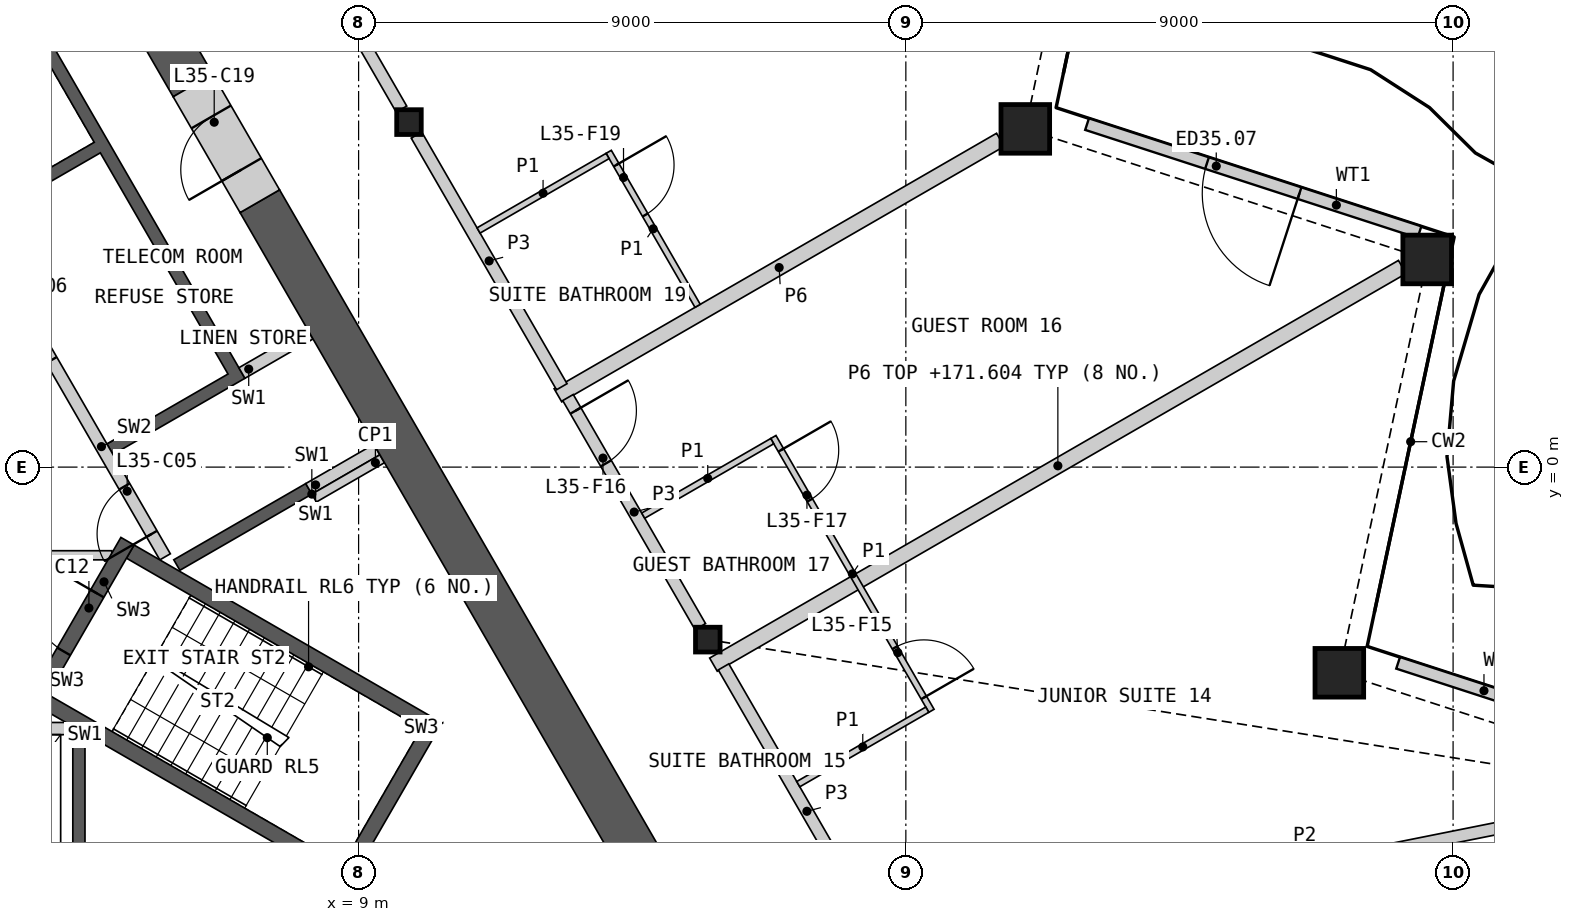
"""IFC4 building model, lengths in metres.
Left out: names, types, materials, properties, quantities, classifications, styles, units other than length and angle.
Written with IfcOpenShell. Run it as: python <this file> out.ifc"""

import sys

from ifc_helpers import new_model, si_unit, direction, frame, frame_2d, origin, origin_2d, place, context, subcontext, project, spatial, polyline, rectangle, hollow_rectangle, i_section, outline, extrude, element, fill, save


model = new_model("IFC4")
c1 = context("Model", 3, precision=1e-05, world=origin(), true_north=direction((0.0, 1.0)))
c2 = subcontext(c1, "Body", "Model", "MODEL_VIEW")
j1 = project(units=[si_unit("LENGTHUNIT", "METRE"), si_unit("PLANEANGLEUNIT", "RADIAN")], contexts=[c1])
p1 = place(None, origin())
s1 = spatial("IfcSite", under=j1, at=p1, CompositionType="ELEMENT")
p2 = place(p1, origin())
s2 = spatial("IfcBuilding", under=s1, at=p2, CompositionType="ELEMENT")
p3 = place(p2, frame((0.0, 0.0, 169.2)))
s3 = spatial("IfcBuildingStorey", under=s2, at=p3, CompositionType="ELEMENT", Elevation=169.2)
for number, where, z_axis, x_axis in (
    (1, (25.129, -3.383, 0.0), (0.0, 0.0, 1.0), (1.0, 0.0, 0.0)),
    (2, (26.574, 3.415, 0.0), (0.0, 0.0, 1.0), (1.0, 0.0, 0.0)),
    (3, (19.965, 5.563, 0.0), (0.0, 0.0, 1.0), (1.0, 0.0, 0.0)),
):
    element("IfcColumn", number, at=place(p3, frame(where, z_axis=z_axis, x_axis=x_axis)), inside=s3, PredefinedType="COLUMN", context=c2, shape_type="SweptSolid", body=[
        extrude(hollow_rectangle(XDim=0.8, YDim=0.8, WallThickness=0.05, at=origin_2d()), origin(), (0.0, 0.0, 1.0), 3.6),
    ])
for number, where, z_axis, x_axis in (
    (4, (14.743, -2.837, 0.0), (0.0, 0.0, 1.0), (1.0, 0.0, 0.0)),
    (5, (9.828, 5.675, 0.0), (0.0, 0.0, 1.0), (1.0, 0.0, 0.0)),
):
    element("IfcColumn", number, at=place(p3, frame(where, z_axis=z_axis, x_axis=x_axis)), inside=s3, PredefinedType="COLUMN", context=c2, shape_type="SweptSolid", body=[
        extrude(i_section(OverallWidth=0.404, OverallDepth=0.407, WebThickness=0.027, FlangeThickness=0.044, at=origin_2d()), origin(), (0.0, 0.0, 1.0), 3.6),
    ])
p4 = place(p3, frame((31.743, -5.054, 0.0), z_axis=(0.0, 0.0, 1.0), x_axis=(-0.951061260164, 0.309002393867, 0.0)))
e6 = element("IfcWall", 6, at=p4, inside=s3, PredefinedType="SOLIDWALL", context=c2, shape_type="SweptSolid", body=[
    extrude(rectangle(XDim=5.938, YDim=0.2, at=frame_2d((2.969, 0.0))), origin(), (0.0, 0.0, 1.0), 2.701),
])
p5 = place(p4, frame((2.264, 0.0, 0.0)))
e7 = element("IfcOpeningElement", 7, at=p5, cuts=e6, PredefinedType="OPENING", context=c2, shape_type="SweptSolid", body=[
    extrude(rectangle(XDim=1.6, YDim=2.4, at=frame_2d((0.8, 1.2))), frame((0.0, 0.11, 0.0), z_axis=(0.0, -1.0, 0.0), x_axis=(1.0, 0.0, 0.0)), (0.0, 0.0, 1.0), 0.22),
])
p6 = place(p3, frame((26.447, 3.865, 0.0), z_axis=(0.0, 0.0, 1.0), x_axis=(-0.951043432761, 0.309057258453, 0.0)))
e8 = element("IfcWall", 8, at=p6, inside=s3, PredefinedType="SOLIDWALL", context=c2, shape_type="SweptSolid", body=[
    extrude(rectangle(XDim=5.748, YDim=0.2, at=frame_2d((2.874, 0.0))), origin(), (0.0, 0.0, 1.0), 2.701),
])
p7 = place(p6, frame((2.074, 0.0, 0.0)))
e9 = element("IfcOpeningElement", 9, at=p7, cuts=e8, PredefinedType="OPENING", context=c2, shape_type="SweptSolid", body=[
    extrude(rectangle(XDim=1.6, YDim=2.4, at=frame_2d((0.8, 1.2))), frame((0.0, 0.11, 0.0), z_axis=(0.0, -1.0, 0.0), x_axis=(1.0, 0.0, 0.0)), (0.0, 0.0, 1.0), 0.22),
])
p8 = place(p3, origin())
e10 = element("IfcWall", 10, at=p8, inside=s3, PredefinedType="SHEAR", context=c2, shape_type="SweptSolid", body=[
    extrude(outline(polyline([(4.5, -4.4), (4.5, -6.906), (2.1, -6.906), (2.1, -4.4), (2.3, -4.4), (2.3, -6.7), (4.3, -6.7), (4.3, -4.4), (4.5, -4.4)])), origin(), (0.0, 0.0, 1.0), 3.25),
])
p9 = place(p3, frame((-4.187, -4.3, 0.0), z_axis=(0.0, 0.0, 1.0), x_axis=(1.0, 0.0, 0.0)))
e11 = element("IfcWall", 11, at=p9, inside=s3, PredefinedType="SOLIDWALL", context=c2, shape_type="SweptSolid", body=[
    extrude(rectangle(XDim=8.373, YDim=0.2, at=frame_2d((4.187, 0.0))), origin(), (0.0, 0.0, 1.0), 3.25),
])
p10 = place(p9, frame((0.287, 0.0, 0.0)))
e12 = element("IfcOpeningElement", 12, at=p10, cuts=e11, PredefinedType="OPENING", context=c2, shape_type="SweptSolid", body=[
    extrude(rectangle(XDim=1.2, YDim=2.1, at=frame_2d((0.6, 1.05))), frame((0.0, 0.11, 0.0), z_axis=(0.0, -1.0, 0.0), x_axis=(1.0, 0.0, 0.0)), (0.0, 0.0, 1.0), 0.22),
])
p11 = place(p9, frame((2.387, 0.0, 0.0)))
e13 = element("IfcOpeningElement", 13, at=p11, cuts=e11, PredefinedType="OPENING", context=c2, shape_type="SweptSolid", body=[
    extrude(rectangle(XDim=1.4, YDim=2.1, at=frame_2d((0.7, 1.05))), frame((0.0, 0.11, 0.0), z_axis=(0.0, -1.0, 0.0), x_axis=(1.0, 0.0, 0.0)), (0.0, 0.0, 1.0), 0.22),
])
p12 = place(p9, frame((4.837, 0.0, 0.0)))
e14 = element("IfcOpeningElement", 14, at=p12, cuts=e11, PredefinedType="OPENING", context=c2, shape_type="SweptSolid", body=[
    extrude(rectangle(XDim=0.9, YDim=2.1, at=frame_2d((0.45, 1.05))), frame((0.0, 0.11, 0.0), z_axis=(0.0, -1.0, 0.0), x_axis=(1.0, 0.0, 0.0)), (0.0, 0.0, 1.0), 0.22),
])
p13 = place(p9, frame((6.887, 0.0, 0.0)))
e15 = element("IfcOpeningElement", 15, at=p13, cuts=e11, PredefinedType="OPENING", context=c2, shape_type="SweptSolid", body=[
    extrude(rectangle(XDim=1.2, YDim=2.1, at=frame_2d((0.6, 1.05))), frame((0.0, 0.11, 0.0), z_axis=(0.0, -1.0, 0.0), x_axis=(1.0, 0.0, 0.0)), (0.0, 0.0, 1.0), 0.22),
])
p14 = place(p3, origin())
e16 = element("IfcWall", 16, at=p14, inside=s3, PredefinedType="SHEAR", context=c2, shape_type="SweptSolid", body=[
    extrude(outline(polyline([(1.561, 6.097), (3.731, 7.35), (7.131, 1.461), (4.96, 0.208), (4.861, 0.381), (6.852, 1.531), (4.752, 5.169), (2.76, 4.019), (2.66, 4.192), (4.652, 5.342), (3.652, 7.074), (1.66, 5.924), (1.561, 6.097)])), origin(), (0.0, 0.0, 1.0), 3.25),
])
p15 = place(p3, origin())
e17 = element("IfcWall", 17, at=p15, inside=s3, PredefinedType="SHEAR", context=c2, shape_type="SweptSolid", body=[
    extrude(outline(polyline([(8.231, -0.444), (6.061, -1.697), (5.96, -1.524), (8.131, -0.271), (8.231, -0.444)])), origin(), (0.0, 0.0, 1.0), 3.25),
])
p16 = place(p3, frame((5.817, -1.476, 0.0), z_axis=(0.0, 0.0, 1.0), x_axis=(-0.500002616675, 0.866023893041, 0.0)))
e18 = element("IfcWall", 18, at=p16, inside=s3, PredefinedType="SOLIDWALL", context=c2, shape_type="SweptSolid", body=[
    extrude(rectangle(XDim=8.373, YDim=0.2, at=frame_2d((4.187, 0.0))), origin(), (0.0, 0.0, 1.0), 3.25),
])
p17 = place(p16, frame((0.437, 0.0, 0.0)))
e19 = element("IfcOpeningElement", 19, at=p17, cuts=e18, PredefinedType="OPENING", context=c2, shape_type="SweptSolid", body=[
    extrude(rectangle(XDim=0.9, YDim=2.1, at=frame_2d((0.45, 1.05))), frame((0.0, 0.11, 0.0), z_axis=(0.0, -1.0, 0.0), x_axis=(1.0, 0.0, 0.0)), (0.0, 0.0, 1.0), 0.22),
])
p18 = place(p16, frame((3.737, 0.0, 0.0)))
e20 = element("IfcOpeningElement", 20, at=p18, cuts=e18, PredefinedType="OPENING", context=c2, shape_type="SweptSolid", body=[
    extrude(rectangle(XDim=0.9, YDim=2.1, at=frame_2d((0.45, 1.05))), frame((0.0, 0.11, 0.0), z_axis=(0.0, -1.0, 0.0), x_axis=(1.0, 0.0, 0.0)), (0.0, 0.0, 1.0), 0.22),
])
p19 = place(p16, frame((6.937, 0.0, 0.0)))
e21 = element("IfcOpeningElement", 21, at=p19, cuts=e18, PredefinedType="OPENING", context=c2, shape_type="SweptSolid", body=[
    extrude(rectangle(XDim=1.1, YDim=2.1, at=frame_2d((0.55, 1.05))), frame((0.0, 0.11, 0.0), z_axis=(0.0, -1.0, 0.0), x_axis=(1.0, 0.0, 0.0)), (0.0, 0.0, 1.0), 0.22),
])
for number, where, z_axis, x_axis in (
    (22, (8.181, -0.357, 0.0), (0.0, 0.0, 1.0), (0.866, 0.5, 0.0)),
    (23, (7.081, 1.548, 0.0), (0.0, 0.0, 1.0), (0.866, 0.5, 0.0)),
):
    element("IfcWall", number, at=place(p3, frame(where, z_axis=z_axis, x_axis=x_axis)), inside=s3, PredefinedType="SHEAR", context=c2, shape_type="SweptSolid", body=[
        extrude(rectangle(XDim=1.293, YDim=0.2, at=frame_2d((0.646, 0.0))), origin(), (0.0, 0.0, 1.0), 3.25),
    ])
p20 = place(p3, frame((-4.941, -1.45, 0.0), z_axis=(0.0, 0.0, 1.0), x_axis=(1.0, 0.0, 0.0)))
e24 = element("IfcWall", 24, at=p20, inside=s3, PredefinedType="PARTITIONING", context=c2, shape_type="SweptSolid", body=[
    extrude(rectangle(XDim=9.882, YDim=0.15, at=frame_2d((4.941, 0.0))), origin(), (0.0, 0.0, 1.0), 3.25),
])
p21 = place(p20, frame((4.391, 0.0, 0.0)))
e25 = element("IfcOpeningElement", 25, at=p21, cuts=e24, PredefinedType="OPENING", context=c2, shape_type="SweptSolid", body=[
    extrude(rectangle(XDim=1.1, YDim=2.1, at=frame_2d((0.55, 1.05))), frame((0.0, 0.085, 0.0), z_axis=(0.0, -1.0, 0.0), x_axis=(1.0, 0.0, 0.0)), (0.0, 0.0, 1.0), 0.17),
])
p22 = place(p3, origin())
e26 = element("IfcWall", 26, at=p22, inside=s3, PredefinedType="SHEAR", context=c2, shape_type="SweptSolid", body=[
    extrude(outline(polyline([(3.763, -3.956), (8.83, -6.881), (8.738, -6.539), (3.888, -3.739), (3.763, -3.956)])), origin(), (0.0, 0.0, 1.0), 3.25),
])
p23 = place(p3, origin())
e27 = element("IfcWall", 27, at=p23, inside=s3, PredefinedType="SHEAR", context=c2, shape_type="SweptSolid", body=[
    extrude(outline(polyline([(8.83, -6.881), (10.374, -4.206), (10.032, -4.298), (8.738, -6.539), (8.83, -6.881)])), origin(), (0.0, 0.0, 1.0), 3.25),
])
p24 = place(p3, origin())
e28 = element("IfcWall", 28, at=p24, inside=s3, PredefinedType="SHEAR", context=c2, shape_type="SweptSolid", body=[
    extrude(outline(polyline([(10.032, -4.298), (10.374, -4.206), (5.307, -1.281), (5.182, -1.498), (10.032, -4.298)])), origin(), (0.0, 0.0, 1.0), 3.25),
])
p25 = place(p3, frame((3.655, -3.893, 0.0), z_axis=(0.0, 0.0, 1.0), x_axis=(0.499982516597, 0.866035497597, 0.0)))
e29 = element("IfcWall", 29, at=p25, inside=s3, PredefinedType="SHEAR", context=c2, shape_type="SweptSolid", body=[
    extrude(rectangle(XDim=3.088, YDim=0.25, at=frame_2d((1.544, 0.0))), origin(), (0.0, 0.0, 1.0), 3.25),
])
p26 = place(p25, frame((0.994, 0.0, 0.0)))
e30 = element("IfcOpeningElement", 30, at=p26, cuts=e29, PredefinedType="OPENING", context=c2, shape_type="SweptSolid", body=[
    extrude(rectangle(XDim=1.1, YDim=2.1, at=frame_2d((0.55, 1.05))), frame((0.0, 0.135, 0.0), z_axis=(0.0, -1.0, 0.0), x_axis=(1.0, 0.0, 0.0)), (0.0, 0.0, 1.0), 0.27),
])
p27 = place(p3, frame((8.268, -0.509, 0.0), z_axis=(0.0, 0.0, 1.0), x_axis=(0.866003189247, 0.500038474733, 0.0)))
e31 = element("IfcWall", 31, at=p27, inside=s3, PredefinedType="PARTITIONING", context=c2, shape_type="SweptSolid", body=[
    extrude(rectangle(XDim=1.293, YDim=0.15, at=frame_2d((0.646, 0.0))), origin(), (0.0, 0.0, 1.0), 3.25),
])
p28 = place(p3, frame((14.526, -8.011, 0.0), z_axis=(0.0, 0.0, 1.0), x_axis=(-0.499994855372, 0.866028374016, 0.0)))
e32 = element("IfcWall", 32, at=p28, inside=s3, PredefinedType="SHEAR", context=c2, shape_type="SweptSolid", body=[
    extrude(rectangle(XDim=14.301, YDim=0.75, at=frame_2d((7.15, 0.0))), origin(), (0.0, 0.0, 1.0), 3.25),
])
p29 = place(p3, frame((6.275, 6.279, 0.0), z_axis=(0.0, 0.0, 1.0), x_axis=(-0.500029273391, 0.866008502124, 0.0)))
e33 = element("IfcWall", 33, at=p29, inside=s3, PredefinedType="SHEAR", context=c2, shape_type="SweptSolid", body=[
    extrude(rectangle(XDim=2.916, YDim=0.75, at=frame_2d((1.458, 0.0))), origin(), (0.0, 0.0, 1.0), 3.25),
])
p30 = place(p3, frame((7.375, 4.374, 0.0), z_axis=(0.0, 0.0, 1.0), x_axis=(-0.499946605688, 0.86605622881, 0.0)))
e34 = element("IfcWall", 34, at=p30, inside=s3, PredefinedType="SHEAR", context=c2, shape_type="SweptSolid", body=[
    extrude(rectangle(XDim=2.2, YDim=0.75, at=frame_2d((1.1, 0.0))), origin(), (0.0, 0.0, 1.0), 3.25),
])
p31 = place(p30, frame((0.6, 0.0, 0.0)))
e35 = element("IfcOpeningElement", 35, at=p31, cuts=e34, PredefinedType="OPENING", context=c2, shape_type="SweptSolid", body=[
    extrude(rectangle(XDim=1.0, YDim=2.1, at=frame_2d((0.5, 1.05))), frame((0.0, 0.385, 0.0), z_axis=(0.0, -1.0, 0.0), x_axis=(1.0, 0.0, 0.0)), (0.0, 0.0, 1.0), 0.77),
])
p32 = place(p3, frame((14.836, -3.249, 0.0), z_axis=(0.0, 0.0, 1.0), x_axis=(0.866022412254, 0.500005181446, 0.0)))
e36 = element("IfcWall", 36, at=p32, inside=s3, PredefinedType="PARTITIONING", context=c2, shape_type="SweptSolid", body=[
    extrude(rectangle(XDim=13.081, YDim=0.25, at=frame_2d((6.541, 0.0))), origin(), (0.0, 0.0, 1.0), 2.404),
])
p33 = place(p3, frame((5.038, 13.972, 0.0), z_axis=(0.0, 0.0, 1.0), x_axis=(0.50000393355, -0.866023132736, 0.0)))
e37 = element("IfcWall", 37, at=p33, inside=s3, PredefinedType="PARTITIONING", context=c2, shape_type="SweptSolid", body=[
    extrude(rectangle(XDim=9.335, YDim=0.2, at=frame_2d((4.667, 0.0))), origin(), (0.0, 0.0, 1.0), 3.25),
])
p34 = place(p33, frame((1.154, 0.0, 0.0)))
e38 = element("IfcOpeningElement", 38, at=p34, cuts=e37, PredefinedType="OPENING", context=c2, shape_type="SweptSolid", body=[
    extrude(rectangle(XDim=1.1, YDim=2.1, at=frame_2d((0.55, 1.05))), frame((0.0, 0.11, 0.0), z_axis=(0.0, -1.0, 0.0), x_axis=(1.0, 0.0, 0.0)), (0.0, 0.0, 1.0), 0.22),
])
p35 = place(p3, frame((12.278, 1.182, 0.0), z_axis=(0.0, 0.0, 1.0), x_axis=(0.866024457297, 0.500001639361, 0.0)))
e39 = element("IfcWall", 39, at=p35, inside=s3, PredefinedType="PARTITIONING", context=c2, shape_type="SweptSolid", body=[
    extrude(rectangle(XDim=8.402, YDim=0.25, at=frame_2d((4.201, 0.0))), origin(), (0.0, 0.0, 1.0), 2.404),
])
p36 = place(p3, frame((15.002, -3.286, 0.0), z_axis=(0.0, 0.0, 1.0), x_axis=(0.500007607708, -0.866021011428, 0.0)))
e40 = element("IfcWall", 40, at=p36, inside=s3, PredefinedType="PARTITIONING", context=c2, shape_type="SweptSolid", body=[
    extrude(rectangle(XDim=5.484, YDim=0.2, at=frame_2d((2.742, 0.0))), origin(), (0.0, 0.0, 1.0), 3.25),
])
p37 = place(p36, frame((4.032, 0.0, 0.0)))
e41 = element("IfcOpeningElement", 41, at=p37, cuts=e40, PredefinedType="OPENING", context=c2, shape_type="SweptSolid", body=[
    extrude(rectangle(XDim=1.1, YDim=2.1, at=frame_2d((0.55, 1.05))), frame((0.0, 0.11, 0.0), z_axis=(0.0, -1.0, 0.0), x_axis=(1.0, 0.0, 0.0)), (0.0, 0.0, 1.0), 0.22),
])
p38 = place(p3, frame((9.952, 5.461, 0.0), z_axis=(0.0, 0.0, 1.0), x_axis=(0.499990736708, -0.866030751883, 0.0)))
e42 = element("IfcWall", 42, at=p38, inside=s3, PredefinedType="PARTITIONING", context=c2, shape_type="SweptSolid", body=[
    extrude(rectangle(XDim=4.779, YDim=0.2, at=frame_2d((2.389, 0.0))), origin(), (0.0, 0.0, 1.0), 3.25),
])
p39 = place(p3, frame((12.444, 1.145, 0.0), z_axis=(0.0, 0.0, 1.0), x_axis=(0.500007404367, -0.866021128829, 0.0)))
e43 = element("IfcWall", 43, at=p39, inside=s3, PredefinedType="PARTITIONING", context=c2, shape_type="SweptSolid", body=[
    extrude(rectangle(XDim=4.351, YDim=0.2, at=frame_2d((2.176, 0.0))), origin(), (0.0, 0.0, 1.0), 3.25),
])
p40 = place(p39, frame((0.25, 0.0, 0.0)))
e44 = element("IfcOpeningElement", 44, at=p40, cuts=e43, PredefinedType="OPENING", context=c2, shape_type="SweptSolid", body=[
    extrude(rectangle(XDim=1.0, YDim=2.1, at=frame_2d((0.5, 1.05))), frame((0.0, 0.11, 0.0), z_axis=(0.0, -1.0, 0.0), x_axis=(1.0, 0.0, 0.0)), (0.0, 0.0, 1.0), 0.22),
])
p41 = place(p3, frame((17.792, -7.929, 0.0), z_axis=(0.0, 0.0, 1.0), x_axis=(0.980565709097, 0.196190953266, 0.0)))
e45 = element("IfcWall", 45, at=p41, inside=s3, PredefinedType="PARTITIONING", context=c2, shape_type="SweptSolid", body=[
    extrude(rectangle(XDim=13.805, YDim=0.2, at=frame_2d((6.903, 0.0))), origin(), (0.0, 0.0, 1.0), 2.404),
])
p42 = place(p3, frame((15.821, 0.495, 0.0), z_axis=(0.0, 0.0, 1.0), x_axis=(0.500006934395, -0.866021400173, 0.0)))
e46 = element("IfcWall", 46, at=p42, inside=s3, PredefinedType="PARTITIONING", context=c2, shape_type="SweptSolid", body=[
    extrude(rectangle(XDim=5.2, YDim=0.1, at=frame_2d((2.6, 0.0))), origin(), (0.0, 0.0, 1.0), 2.404),
])
p43 = place(p42, frame((4.0, 0.0, 0.0)))
e47 = element("IfcOpeningElement", 47, at=p43, cuts=e46, PredefinedType="OPENING", context=c2, shape_type="SweptSolid", body=[
    extrude(rectangle(XDim=0.95, YDim=2.1, at=frame_2d((0.475, 1.05))), frame((0.0, 0.06, 0.0), z_axis=(0.0, -1.0, 0.0), x_axis=(1.0, 0.0, 0.0)), (0.0, 0.0, 1.0), 0.12),
])
p44 = place(p42, frame((0.25, 0.0, 0.0)))
e48 = element("IfcOpeningElement", 48, at=p44, cuts=e46, PredefinedType="OPENING", context=c2, shape_type="SweptSolid", body=[
    extrude(rectangle(XDim=0.95, YDim=2.1, at=frame_2d((0.475, 1.05))), frame((0.0, 0.06, 0.0), z_axis=(0.0, -1.0, 0.0), x_axis=(1.0, 0.0, 0.0)), (0.0, 0.0, 1.0), 0.12),
])
p45 = place(p3, frame((13.113, 5.186, 0.0), z_axis=(0.0, 0.0, 1.0), x_axis=(0.499963291492, -0.866046596414, 0.0)))
e49 = element("IfcWall", 49, at=p45, inside=s3, PredefinedType="PARTITIONING", context=c2, shape_type="SweptSolid", body=[
    extrude(rectangle(XDim=2.925, YDim=0.1, at=frame_2d((1.462, 0.0))), origin(), (0.0, 0.0, 1.0), 2.404),
])
p46 = place(p45, frame((0.25, 0.0, 0.0)))
e50 = element("IfcOpeningElement", 50, at=p46, cuts=e49, PredefinedType="OPENING", context=c2, shape_type="SweptSolid", body=[
    extrude(rectangle(XDim=0.95, YDim=2.1, at=frame_2d((0.475, 1.05))), frame((0.0, 0.06, 0.0), z_axis=(0.0, -1.0, 0.0), x_axis=(1.0, 0.0, 0.0)), (0.0, 0.0, 1.0), 0.12),
])
p47 = place(p3, frame((16.231, -5.215, 0.0), z_axis=(0.0, 0.0, 1.0), x_axis=(0.866057815567, 0.499943856944, 0.0)))
e51 = element("IfcWall", 51, at=p47, inside=s3, PredefinedType="PARTITIONING", context=c2, shape_type="SweptSolid", body=[
    extrude(rectangle(XDim=2.45, YDim=0.1, at=frame_2d((1.225, 0.0))), origin(), (0.0, 0.0, 1.0), 2.404),
])
p48 = place(p3, frame((13.681, -0.798, 0.0), z_axis=(0.0, 0.0, 1.0), x_axis=(0.866032905446, 0.499987006516, 0.0)))
e52 = element("IfcWall", 52, at=p48, inside=s3, PredefinedType="PARTITIONING", context=c2, shape_type="SweptSolid", body=[
    extrude(rectangle(XDim=2.45, YDim=0.1, at=frame_2d((1.225, 0.0))), origin(), (0.0, 0.0, 1.0), 2.404),
])
p49 = place(p3, frame((10.973, 3.892, 0.0), z_axis=(0.0, 0.0, 1.0), x_axis=(0.866014668023, 0.500018594424, 0.0)))
e53 = element("IfcWall", 53, at=p49, inside=s3, PredefinedType="PARTITIONING", context=c2, shape_type="SweptSolid", body=[
    extrude(rectangle(XDim=2.45, YDim=0.1, at=frame_2d((1.225, 0.0))), origin(), (0.0, 0.0, 1.0), 2.404),
])
p50 = place(p7, origin())
e54 = element("IfcDoor", 54, at=p50, inside=s3, OperationType="DOUBLE_DOOR_SINGLE_SWING", PredefinedType="DOOR", context=c2, shape_type="SweptSolid", body=[
    extrude(rectangle(XDim=1.6, YDim=2.4, at=frame_2d((0.8, 1.2))), frame((0.0, 0.025, 0.0), z_axis=(0.0, -1.0, 0.0), x_axis=(1.0, 0.0, 0.0)), (0.0, 0.0, 1.0), 0.05),
])
fill(e9, e54)
p51 = place(p17, origin())
e55 = element("IfcDoor", 55, at=p51, inside=s3, OperationType="SINGLE_SWING_LEFT", PredefinedType="DOOR", context=c2, shape_type="SweptSolid", body=[
    extrude(rectangle(XDim=0.9, YDim=2.1, at=frame_2d((0.45, 1.05))), frame((0.0, 0.025, 0.0), z_axis=(0.0, -1.0, 0.0), x_axis=(1.0, 0.0, 0.0)), (0.0, 0.0, 1.0), 0.05),
])
fill(e19, e55)
p52 = place(p18, origin())
e56 = element("IfcDoor", 56, at=p52, inside=s3, OperationType="SINGLE_SWING_RIGHT", PredefinedType="DOOR", context=c2, shape_type="SweptSolid", body=[
    extrude(rectangle(XDim=0.9, YDim=2.1, at=frame_2d((0.45, 1.05))), frame((0.0, 0.025, 0.0), z_axis=(0.0, -1.0, 0.0), x_axis=(1.0, 0.0, 0.0)), (0.0, 0.0, 1.0), 0.05),
])
fill(e20, e56)
p53 = place(p26, origin())
e57 = element("IfcDoor", 57, at=p53, inside=s3, OperationType="SINGLE_SWING_RIGHT", PredefinedType="DOOR", context=c2, shape_type="SweptSolid", body=[
    extrude(rectangle(XDim=1.1, YDim=2.1, at=frame_2d((0.55, 1.05))), frame((0.0, 0.025, 0.0), z_axis=(0.0, -1.0, 0.0), x_axis=(1.0, 0.0, 0.0)), (0.0, 0.0, 1.0), 0.05),
])
fill(e30, e57)
p54 = place(p31, origin())
e58 = element("IfcDoor", 58, at=p54, inside=s3, OperationType="SINGLE_SWING_LEFT", PredefinedType="DOOR", context=c2, shape_type="SweptSolid", body=[
    extrude(rectangle(XDim=1.0, YDim=2.1, at=frame_2d((0.5, 1.05))), frame((0.0, 0.13, 0.0), z_axis=(0.0, -1.0, 0.0), x_axis=(1.0, 0.0, 0.0)), (0.0, 0.0, 1.0), 0.05),
])
fill(e35, e58)
p55 = place(p43, origin())
e59 = element("IfcDoor", 59, at=p55, inside=s3, OperationType="SINGLE_SWING_RIGHT", PredefinedType="DOOR", context=c2, shape_type="SweptSolid", body=[
    extrude(rectangle(XDim=0.95, YDim=2.1, at=frame_2d((0.475, 1.05))), frame((0.0, 0.025, 0.0), z_axis=(0.0, -1.0, 0.0), x_axis=(1.0, 0.0, 0.0)), (0.0, 0.0, 1.0), 0.05),
])
fill(e47, e59)
p56 = place(p40, origin())
e60 = element("IfcDoor", 60, at=p56, inside=s3, OperationType="SINGLE_SWING_LEFT", PredefinedType="DOOR", context=c2, shape_type="SweptSolid", body=[
    extrude(rectangle(XDim=1.0, YDim=2.1, at=frame_2d((0.5, 1.05))), frame((0.0, 0.025, 0.0), z_axis=(0.0, -1.0, 0.0), x_axis=(1.0, 0.0, 0.0)), (0.0, 0.0, 1.0), 0.05),
])
fill(e44, e60)
p57 = place(p44, origin())
e61 = element("IfcDoor", 61, at=p57, inside=s3, OperationType="SINGLE_SWING_LEFT", PredefinedType="DOOR", context=c2, shape_type="SweptSolid", body=[
    extrude(rectangle(XDim=0.95, YDim=2.1, at=frame_2d((0.475, 1.05))), frame((0.0, 0.025, 0.0), z_axis=(0.0, -1.0, 0.0), x_axis=(1.0, 0.0, 0.0)), (0.0, 0.0, 1.0), 0.05),
])
fill(e48, e61)
p58 = place(p46, origin())
e62 = element("IfcDoor", 62, at=p58, inside=s3, OperationType="SINGLE_SWING_LEFT", PredefinedType="DOOR", context=c2, shape_type="SweptSolid", body=[
    extrude(rectangle(XDim=0.95, YDim=2.1, at=frame_2d((0.475, 1.05))), frame((0.0, 0.025, 0.0), z_axis=(0.0, -1.0, 0.0), x_axis=(1.0, 0.0, 0.0)), (0.0, 0.0, 1.0), 0.05),
])
fill(e50, e62)
save(model, sys.argv[1])
